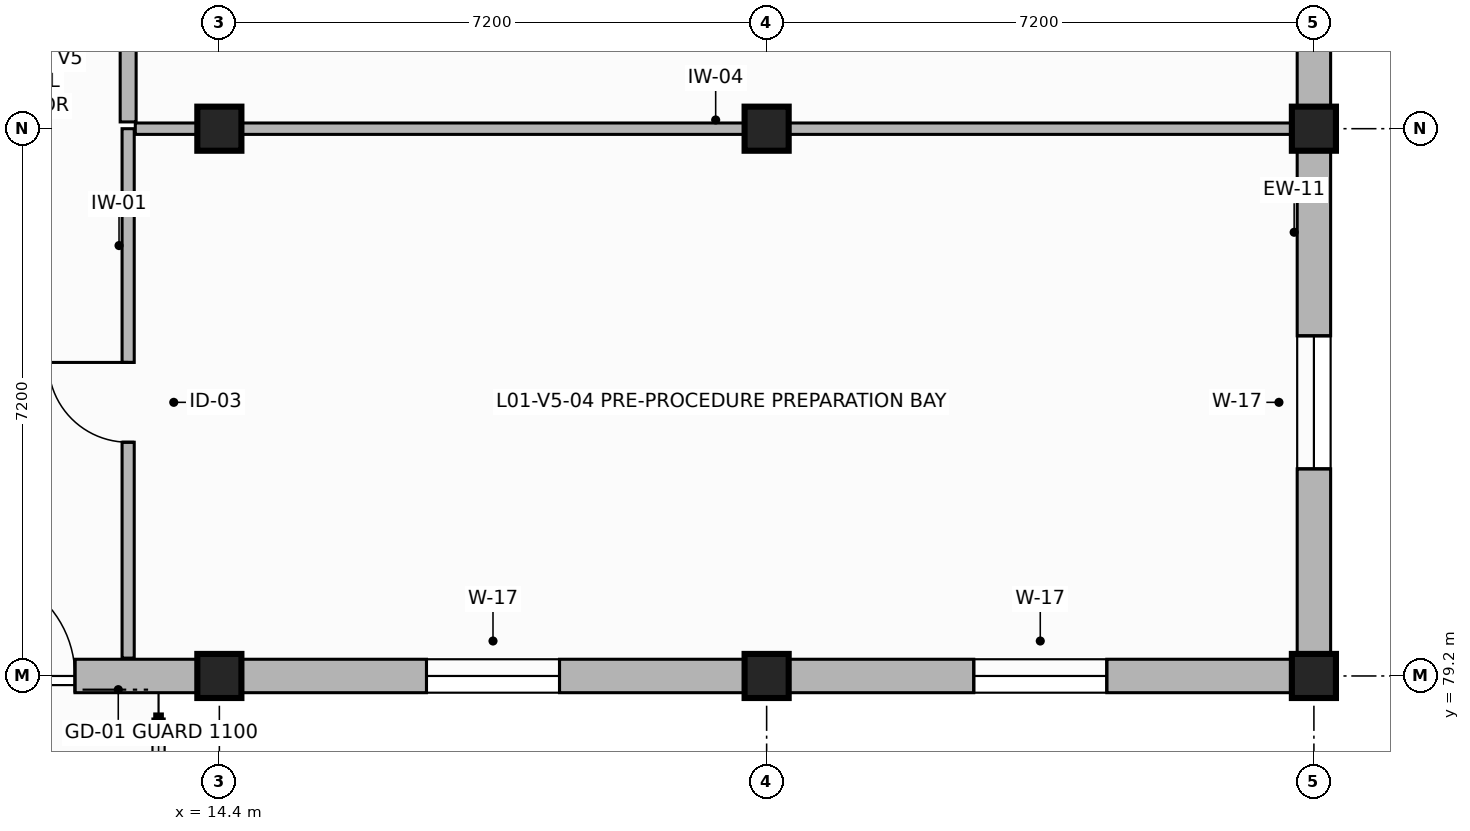
"""IFC4 building model, lengths in metres.
Left out: names, types, materials, properties, quantities, classifications, styles, units other than length and angle.
Written with IfcOpenShell. Run it as: python <this file> out.ifc"""

import sys

from ifc_helpers import new_model, si_unit, direction, frame, frame_2d, origin, origin_2d, place, context, subcontext, project, spatial, rectangle, extrude, element, fill, save


model = new_model("IFC4")
c1 = context("Model", 3, precision=1e-05, world=origin(), true_north=direction((0.0, 1.0)))
c2 = subcontext(c1, "Body", "Model", "MODEL_VIEW")
j1 = project(units=[si_unit("LENGTHUNIT", "METRE"), si_unit("PLANEANGLEUNIT", "RADIAN")], contexts=[c1])
p1 = place(None, origin())
s1 = spatial("IfcSite", under=j1, at=p1, CompositionType="ELEMENT")
p2 = place(p1, origin())
s2 = spatial("IfcBuilding", under=s1, at=p2, CompositionType="ELEMENT")
p3 = place(p2, frame((0.0, 0.0, 4.5)))
s3 = spatial("IfcBuildingStorey", under=s2, at=p3, CompositionType="ELEMENT", Elevation=4.5)
for number, where, z_axis, x_axis in (
    (1, (14.4, 79.2, 0.0), (0.0, 0.0, 1.0), (1.0, 0.0, 0.0)),
    (2, (14.4, 86.4, 0.0), (0.0, 0.0, 1.0), (1.0, 0.0, 0.0)),
    (3, (21.6, 79.2, 0.0), (0.0, 0.0, 1.0), (1.0, 0.0, 0.0)),
    (4, (21.6, 86.4, 0.0), (0.0, 0.0, 1.0), (1.0, 0.0, 0.0)),
    (5, (28.8, 79.2, 0.0), (0.0, 0.0, 1.0), (1.0, 0.0, 0.0)),
    (6, (28.8, 86.4, 0.0), (0.0, 0.0, 1.0), (1.0, 0.0, 0.0)),
):
    element("IfcColumn", number, at=place(p3, frame(where, z_axis=z_axis, x_axis=x_axis)), inside=s3, PredefinedType="COLUMN", context=c2, shape_type="SweptSolid", body=[
        extrude(rectangle(XDim=0.58, YDim=0.58, at=origin_2d()), origin(), (0.0, 0.0, 1.0), 3.59),
    ])
p4 = place(p3, frame((7.2, 79.2, 0.0), z_axis=(0.0, 0.0, 1.0), x_axis=(1.0, 0.0, 0.0)))
e7 = element("IfcWall", 7, at=p4, inside=s3, PredefinedType="SOLIDWALL", context=c2, shape_type="SweptSolid", body=[
    extrude(rectangle(XDim=7.2, YDim=0.44, at=frame_2d((3.6, 0.0))), origin(), (0.0, 0.0, 1.0), 2.92),
])
p5 = place(p4, frame((3.9, 0.0, 0.0)))
e8 = element("IfcOpeningElement", 8, at=p5, cuts=e7, PredefinedType="OPENING", context=c2, shape_type="SweptSolid", body=[
    extrude(rectangle(XDim=1.4, YDim=2.25, at=frame_2d((0.7, 1.125))), frame((0.0, 0.23, 0.0), z_axis=(0.0, -1.0, 0.0), x_axis=(1.0, 0.0, 0.0)), (0.0, 0.0, 1.0), 0.46),
])
p6 = place(p3, frame((14.4, 79.2, 0.0), z_axis=(0.0, 0.0, 1.0), x_axis=(1.0, 0.0, 0.0)))
e9 = element("IfcWall", 9, at=p6, inside=s3, PredefinedType="SOLIDWALL", context=c2, shape_type="SweptSolid", body=[
    extrude(rectangle(XDim=7.2, YDim=0.44, at=frame_2d((3.6, 0.0))), origin(), (0.0, 0.0, 1.0), 2.92),
])
p7 = place(p6, frame((2.725, 0.0, 0.9)))
e10 = element("IfcOpeningElement", 10, at=p7, cuts=e9, PredefinedType="OPENING", context=c2, shape_type="SweptSolid", body=[
    extrude(rectangle(XDim=1.75, YDim=1.8, at=frame_2d((0.875, 0.9))), frame((0.0, 0.23, 0.0), z_axis=(0.0, -1.0, 0.0), x_axis=(1.0, 0.0, 0.0)), (0.0, 0.0, 1.0), 0.46),
])
p8 = place(p3, frame((21.6, 79.2, 0.0), z_axis=(0.0, 0.0, 1.0), x_axis=(1.0, 0.0, 0.0)))
e11 = element("IfcWall", 11, at=p8, inside=s3, PredefinedType="SOLIDWALL", context=c2, shape_type="SweptSolid", body=[
    extrude(rectangle(XDim=7.2, YDim=0.44, at=frame_2d((3.6, 0.0))), origin(), (0.0, 0.0, 1.0), 2.92),
])
p9 = place(p8, frame((2.725, 0.0, 0.9)))
e12 = element("IfcOpeningElement", 12, at=p9, cuts=e11, PredefinedType="OPENING", context=c2, shape_type="SweptSolid", body=[
    extrude(rectangle(XDim=1.75, YDim=1.8, at=frame_2d((0.875, 0.9))), frame((0.0, 0.23, 0.0), z_axis=(0.0, -1.0, 0.0), x_axis=(1.0, 0.0, 0.0)), (0.0, 0.0, 1.0), 0.46),
])
p10 = place(p3, frame((28.8, 79.2, 0.0), z_axis=(0.0, 0.0, 1.0), x_axis=(0.0, 1.0, 0.0)))
e13 = element("IfcWall", 13, at=p10, inside=s3, PredefinedType="SOLIDWALL", context=c2, shape_type="SweptSolid", body=[
    extrude(rectangle(XDim=7.2, YDim=0.44, at=frame_2d((3.6, 0.0))), origin(), (0.0, 0.0, 1.0), 2.92),
])
p11 = place(p10, frame((2.725, 0.0, 0.9)))
e14 = element("IfcOpeningElement", 14, at=p11, cuts=e13, PredefinedType="OPENING", context=c2, shape_type="SweptSolid", body=[
    extrude(rectangle(XDim=1.75, YDim=1.8, at=frame_2d((0.875, 0.9))), frame((0.0, 0.23, 0.0), z_axis=(0.0, -1.0, 0.0), x_axis=(1.0, 0.0, 0.0)), (0.0, 0.0, 1.0), 0.46),
])
p12 = place(p3, frame((28.8, 86.4, 0.0), z_axis=(0.0, 0.0, 1.0), x_axis=(0.0, 1.0, 0.0)))
e15 = element("IfcWall", 15, at=p12, inside=s3, PredefinedType="SOLIDWALL", context=c2, shape_type="SweptSolid", body=[
    extrude(rectangle(XDim=7.2, YDim=0.44, at=frame_2d((3.6, 0.0))), origin(), (0.0, 0.0, 1.0), 2.92),
])
p13 = place(p12, frame((2.725, 0.0, 0.9)))
e16 = element("IfcOpeningElement", 16, at=p13, cuts=e15, PredefinedType="OPENING", context=c2, shape_type="SweptSolid", body=[
    extrude(rectangle(XDim=1.75, YDim=1.8, at=frame_2d((0.875, 0.9))), frame((0.0, 0.23, 0.0), z_axis=(0.0, -1.0, 0.0), x_axis=(1.0, 0.0, 0.0)), (0.0, 0.0, 1.0), 0.46),
])
p14 = place(p3, frame((13.2, 79.435, 0.0), z_axis=(0.0, 0.0, 1.0), x_axis=(0.0, 1.0, 0.0)))
e17 = element("IfcWall", 17, at=p14, inside=s3, PredefinedType="PARTITIONING", context=c2, shape_type="SweptSolid", body=[
    extrude(rectangle(XDim=6.965, YDim=0.16, at=frame_2d((3.482, 0.0))), origin(), (0.0, 0.0, 1.0), 2.9),
])
p15 = place(p14, frame((2.84, 0.0, 0.0)))
e18 = element("IfcOpeningElement", 18, at=p15, cuts=e17, PredefinedType="OPENING", context=c2, shape_type="SweptSolid", body=[
    extrude(rectangle(XDim=1.05, YDim=2.15, at=frame_2d((0.525, 1.075))), frame((0.0, 0.09, 0.0), z_axis=(0.0, -1.0, 0.0), x_axis=(1.0, 0.0, 0.0)), (0.0, 0.0, 1.0), 0.18),
])
p16 = place(p3, frame((13.294, 86.4, 0.0), z_axis=(0.0, 0.0, 1.0), x_axis=(1.0, 0.0, 0.0)))
e19 = element("IfcWall", 19, at=p16, inside=s3, PredefinedType="PARTITIONING", context=c2, shape_type="SweptSolid", body=[
    extrude(rectangle(XDim=15.271, YDim=0.15, at=frame_2d((7.635, 0.0))), origin(), (0.0, 0.0, 1.0), 2.9),
])
p17 = place(p3, frame((13.2, 86.489, 0.0), z_axis=(0.0, 0.0, 1.0), x_axis=(0.0, 1.0, 0.0)))
e20 = element("IfcWall", 20, at=p17, inside=s3, PredefinedType="PARTITIONING", context=c2, shape_type="SweptSolid", body=[
    extrude(rectangle(XDim=14.311, YDim=0.21, at=frame_2d((7.156, 0.0))), origin(), (0.0, 0.0, 1.0), 2.9),
])
p18 = place(p17, frame((10.206, 0.0, 0.0)))
e21 = element("IfcOpeningElement", 21, at=p18, cuts=e20, PredefinedType="OPENING", context=c2, shape_type="SweptSolid", body=[
    extrude(rectangle(XDim=0.95, YDim=2.15, at=frame_2d((0.475, 1.075))), frame((0.0, 0.115, 0.0), z_axis=(0.0, -1.0, 0.0), x_axis=(1.0, 0.0, 0.0)), (0.0, 0.0, 1.0), 0.23),
])
p19 = place(p5, origin())
e22 = element("IfcDoor", 22, at=p19, inside=s3, OperationType="SINGLE_SWING_LEFT", PredefinedType="DOOR", context=c2, shape_type="SweptSolid", body=[
    extrude(rectangle(XDim=1.4, YDim=2.25, at=frame_2d((0.7, 1.125))), frame((0.0, 0.025, 0.0), z_axis=(0.0, -1.0, 0.0), x_axis=(1.0, 0.0, 0.0)), (0.0, 0.0, 1.0), 0.05),
])
fill(e8, e22)
p20 = place(p7, origin())
e23 = element("IfcWindow", 23, at=p20, inside=s3, PartitioningType="SINGLE_PANEL", PredefinedType="WINDOW", context=c2, shape_type="SweptSolid", body=[
    extrude(rectangle(XDim=1.75, YDim=1.8, at=frame_2d((0.875, 0.9))), frame((0.0, 0.03, 0.0), z_axis=(0.0, -1.0, 0.0), x_axis=(1.0, 0.0, 0.0)), (0.0, 0.0, 1.0), 0.06),
])
fill(e10, e23)
p21 = place(p9, origin())
e24 = element("IfcWindow", 24, at=p21, inside=s3, PartitioningType="SINGLE_PANEL", PredefinedType="WINDOW", context=c2, shape_type="SweptSolid", body=[
    extrude(rectangle(XDim=1.75, YDim=1.8, at=frame_2d((0.875, 0.9))), frame((0.0, 0.03, 0.0), z_axis=(0.0, -1.0, 0.0), x_axis=(1.0, 0.0, 0.0)), (0.0, 0.0, 1.0), 0.06),
])
fill(e12, e24)
p22 = place(p11, origin())
e25 = element("IfcWindow", 25, at=p22, inside=s3, PartitioningType="SINGLE_PANEL", PredefinedType="WINDOW", context=c2, shape_type="SweptSolid", body=[
    extrude(rectangle(XDim=1.75, YDim=1.8, at=frame_2d((0.875, 0.9))), frame((0.0, 0.03, 0.0), z_axis=(0.0, -1.0, 0.0), x_axis=(1.0, 0.0, 0.0)), (0.0, 0.0, 1.0), 0.06),
])
fill(e14, e25)
p23 = place(p15, origin())
e26 = element("IfcDoor", 26, at=p23, inside=s3, OperationType="SINGLE_SWING_RIGHT", PredefinedType="DOOR", context=c2, shape_type="SweptSolid", body=[
    extrude(rectangle(XDim=1.05, YDim=2.15, at=frame_2d((0.525, 1.075))), frame((0.0, 0.025, 0.0), z_axis=(0.0, -1.0, 0.0), x_axis=(1.0, 0.0, 0.0)), (0.0, 0.0, 1.0), 0.05),
])
fill(e18, e26)
save(model, sys.argv[1])
